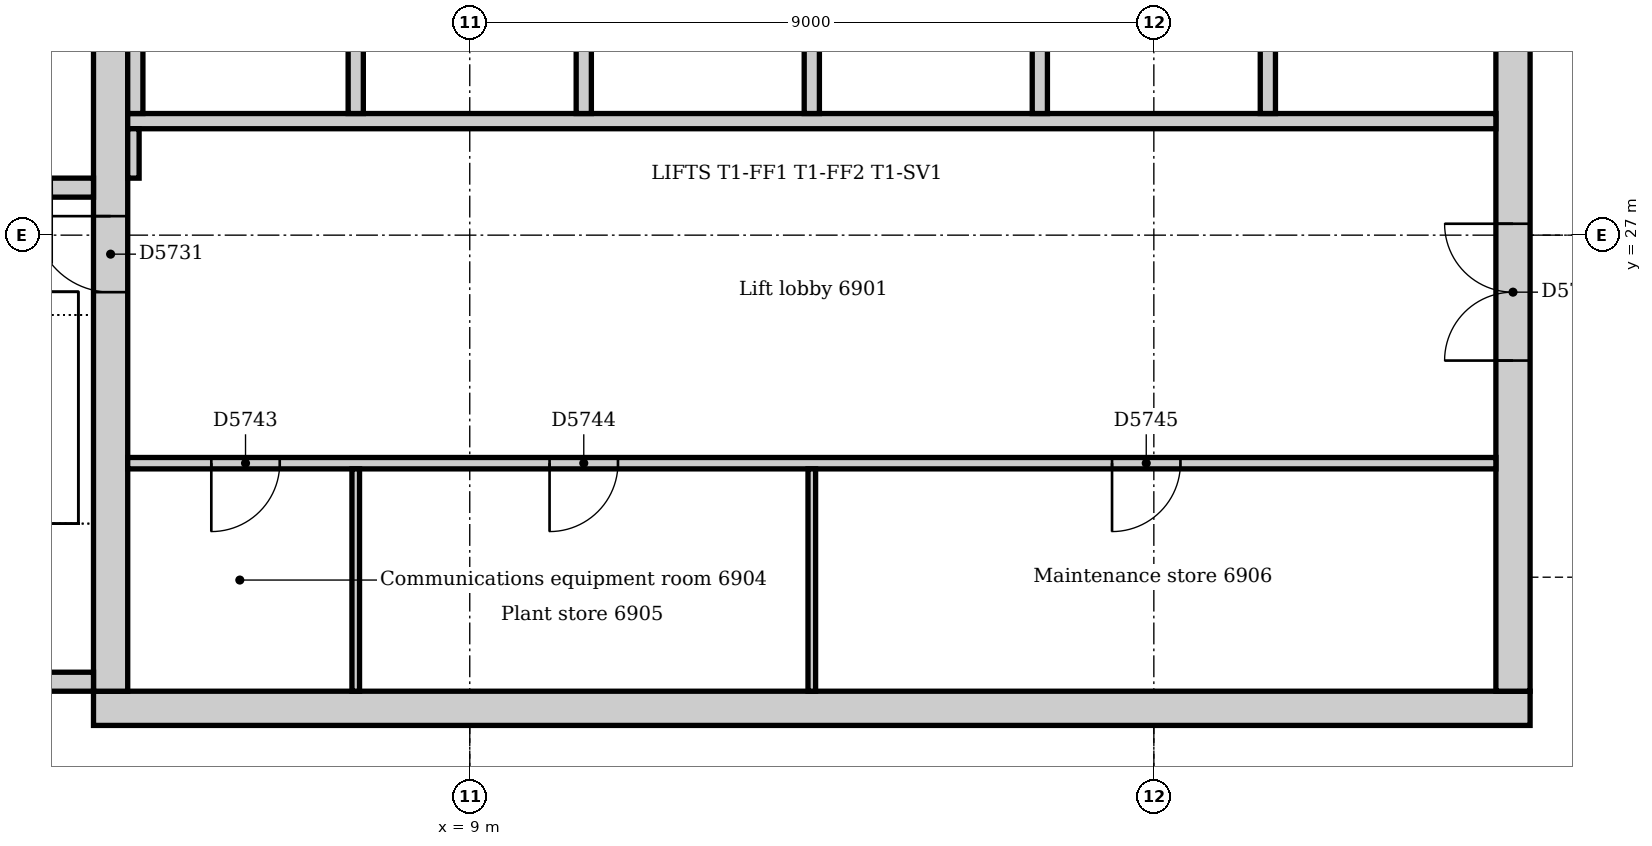
"""IFC4 building model, lengths in metres.
Left out: names, types, materials, properties, quantities, classifications, styles, units other than length and angle.
Written with IfcOpenShell. Run it as: python <this file> out.ifc"""

import sys

from ifc_helpers import new_model, si_unit, direction, frame, frame_2d, origin, place, context, subcontext, project, spatial, rectangle, extrude, element, fill, save


model = new_model("IFC4")
c1 = context("Model", 3, precision=1e-05, world=origin(), true_north=direction((0.0, 1.0)))
c2 = subcontext(c1, "Body", "Model", "MODEL_VIEW")
j1 = project(units=[si_unit("LENGTHUNIT", "METRE"), si_unit("PLANEANGLEUNIT", "RADIAN")], contexts=[c1])
p1 = place(None, origin())
s1 = spatial("IfcSite", under=j1, at=p1, CompositionType="ELEMENT")
p2 = place(p1, origin())
s2 = spatial("IfcBuilding", under=s1, at=p2, CompositionType="ELEMENT")
p3 = place(p2, frame((0.0, 0.0, 291.0)))
s3 = spatial("IfcBuildingStorey", under=s2, at=p3, CompositionType="ELEMENT", Elevation=291.0)
p4 = place(p3, frame((4.05, 20.775, 0.0), z_axis=(0.0, 0.0, 1.0), x_axis=(1.0, 0.0, 0.0)))
e1 = element("IfcWall", 1, at=p4, inside=s3, PredefinedType="SOLIDWALL", context=c2, shape_type="SweptSolid", body=[
    extrude(rectangle(XDim=18.9, YDim=0.45, at=frame_2d((9.45, 0.0))), origin(), (0.0, 0.0, 1.0), 6.55),
])
p5 = place(p3, frame((22.725, 21.0, 0.0), z_axis=(0.0, 0.0, 1.0), x_axis=(0.0, 1.0, 0.0)))
e2 = element("IfcWall", 2, at=p5, inside=s3, PredefinedType="SOLIDWALL", context=c2, shape_type="SweptSolid", body=[
    extrude(rectangle(XDim=10.5, YDim=0.45, at=frame_2d((5.25, 0.0))), origin(), (0.0, 0.0, 1.0), 6.55),
])
p6 = place(p5, frame((4.35, 0.0, 0.0)))
e3 = element("IfcOpeningElement", 3, at=p6, cuts=e2, PredefinedType="OPENING", context=c2, shape_type="SweptSolid", body=[
    extrude(rectangle(XDim=1.8, YDim=2.1, at=frame_2d((0.9, 1.05))), frame((0.0, 0.235, 0.0), z_axis=(0.0, -1.0, 0.0), x_axis=(1.0, 0.0, 0.0)), (0.0, 0.0, 1.0), 0.47),
])
p7 = place(p3, frame((4.275, 31.5, 0.0), z_axis=(0.0, 0.0, 1.0), x_axis=(0.0, -1.0, 0.0)))
e4 = element("IfcWall", 4, at=p7, inside=s3, PredefinedType="SOLIDWALL", context=c2, shape_type="SweptSolid", body=[
    extrude(rectangle(XDim=10.5, YDim=0.45, at=frame_2d((5.25, 0.0))), origin(), (0.0, 0.0, 1.0), 6.55),
])
p8 = place(p7, frame((4.25, 0.0, 0.0)))
e5 = element("IfcOpeningElement", 5, at=p8, cuts=e4, PredefinedType="OPENING", context=c2, shape_type="SweptSolid", body=[
    extrude(rectangle(XDim=1.0, YDim=2.1, at=frame_2d((0.5, 1.05))), frame((0.0, 0.235, 0.0), z_axis=(0.0, -1.0, 0.0), x_axis=(1.0, 0.0, 0.0)), (0.0, 0.0, 1.0), 0.47),
])
p9 = place(p3, frame((0.36, 21.125, 0.0), z_axis=(0.0, 0.0, 1.0), x_axis=(1.0, 0.0, 0.0)))
e6 = element("IfcWall", 6, at=p9, inside=s3, PredefinedType="SOLIDWALL", context=c2, shape_type="SweptSolid", body=[
    extrude(rectangle(XDim=3.69, YDim=0.25, at=frame_2d((1.845, 0.0))), origin(), (0.0, 0.0, 1.0), 6.55),
])
p10 = place(p3, frame((4.05, 27.625, 0.0), z_axis=(0.0, 0.0, 1.0), x_axis=(-1.0, 0.0, 0.0)))
e7 = element("IfcWall", 7, at=p10, inside=s3, PredefinedType="SOLIDWALL", context=c2, shape_type="SweptSolid", body=[
    extrude(rectangle(XDim=3.69, YDim=0.25, at=frame_2d((1.845, 0.0))), origin(), (0.0, 0.0, 1.0), 6.55),
])
p11 = place(p10, frame((0.55, 0.0, 0.0)))
e8 = element("IfcOpeningElement", 8, at=p11, cuts=e7, PredefinedType="OPENING", context=c2, shape_type="SweptSolid", body=[
    extrude(rectangle(XDim=1.0, YDim=2.1, at=frame_2d((0.5, 1.05))), frame((0.0, 0.135, 0.0), z_axis=(0.0, -1.0, 0.0), x_axis=(1.0, 0.0, 0.0)), (0.0, 0.0, 1.0), 0.27),
])
p12 = place(p3, frame((4.5, 28.5, 0.0), z_axis=(0.0, 0.0, 1.0), x_axis=(1.0, 0.0, 0.0)))
e9 = element("IfcWall", 9, at=p12, inside=s3, PredefinedType="PARTITIONING", context=c2, shape_type="SweptSolid", body=[
    extrude(rectangle(XDim=18.0, YDim=0.2, at=frame_2d((9.0, 0.0))), origin(), (0.0, 0.0, 1.0), 6.55),
])
for number, where, z_axis, x_axis in (
    (10, (10.5, 28.6, 0.0), (0.0, 0.0, 1.0), (0.0, 1.0, 0.0)),
    (11, (13.5, 28.6, 0.0), (0.0, 0.0, 1.0), (0.0, 1.0, 0.0)),
    (12, (16.5, 28.6, 0.0), (0.0, 0.0, 1.0), (0.0, 1.0, 0.0)),
    (13, (19.5, 28.6, 0.0), (0.0, 0.0, 1.0), (0.0, 1.0, 0.0)),
    (14, (4.6, 28.6, 0.0), (0.0, 0.0, 1.0), (0.0, 1.0, 0.0)),
    (15, (7.5, 28.6, 0.0), (0.0, 0.0, 1.0), (0.0, 1.0, 0.0)),
):
    element("IfcWall", number, at=place(p3, frame(where, z_axis=z_axis, x_axis=x_axis)), inside=s3, PredefinedType="PARTITIONING", context=c2, shape_type="SweptSolid", body=[
        extrude(rectangle(XDim=2.65, YDim=0.2, at=frame_2d((1.325, 0.0))), origin(), (0.0, 0.0, 1.0), 6.55),
    ])
p13 = place(p3, frame((4.5, 24.0, 0.0), z_axis=(0.0, 0.0, 1.0), x_axis=(1.0, 0.0, 0.0)))
e16 = element("IfcWall", 16, at=p13, inside=s3, PredefinedType="PARTITIONING", context=c2, shape_type="SweptSolid", body=[
    extrude(rectangle(XDim=18.0, YDim=0.15, at=frame_2d((9.0, 0.0))), origin(), (0.0, 0.0, 1.0), 6.55),
])
p14 = place(p13, frame((1.1, 0.0, 0.0)))
e17 = element("IfcOpeningElement", 17, at=p14, cuts=e16, PredefinedType="OPENING", context=c2, shape_type="SweptSolid", body=[
    extrude(rectangle(XDim=0.9, YDim=2.1, at=frame_2d((0.45, 1.05))), frame((0.0, 0.085, 0.0), z_axis=(0.0, -1.0, 0.0), x_axis=(1.0, 0.0, 0.0)), (0.0, 0.0, 1.0), 0.17),
])
p15 = place(p13, frame((5.55, 0.0, 0.0)))
e18 = element("IfcOpeningElement", 18, at=p15, cuts=e16, PredefinedType="OPENING", context=c2, shape_type="SweptSolid", body=[
    extrude(rectangle(XDim=0.9, YDim=2.1, at=frame_2d((0.45, 1.05))), frame((0.0, 0.085, 0.0), z_axis=(0.0, -1.0, 0.0), x_axis=(1.0, 0.0, 0.0)), (0.0, 0.0, 1.0), 0.17),
])
p16 = place(p13, frame((12.95, 0.0, 0.0)))
e19 = element("IfcOpeningElement", 19, at=p16, cuts=e16, PredefinedType="OPENING", context=c2, shape_type="SweptSolid", body=[
    extrude(rectangle(XDim=0.9, YDim=2.1, at=frame_2d((0.45, 1.05))), frame((0.0, 0.085, 0.0), z_axis=(0.0, -1.0, 0.0), x_axis=(1.0, 0.0, 0.0)), (0.0, 0.0, 1.0), 0.17),
])
p17 = place(p3, frame((4.575, 27.75, 0.0), z_axis=(0.0, 0.0, 1.0), x_axis=(0.0, 1.0, 0.0)))
e20 = element("IfcWall", 20, at=p17, inside=s3, PredefinedType="PARTITIONING", context=c2, shape_type="SweptSolid", body=[
    extrude(rectangle(XDim=0.65, YDim=0.15, at=frame_2d((0.325, 0.0))), origin(), (0.0, 0.0, 1.0), 6.55),
])
for number, where, z_axis, x_axis in (
    (21, (7.5, 21.0, 0.0), (0.0, 0.0, 1.0), (0.0, 1.0, 0.0)),
    (22, (13.5, 21.0, 0.0), (0.0, 0.0, 1.0), (0.0, 1.0, 0.0)),
):
    element("IfcWall", number, at=place(p3, frame(where, z_axis=z_axis, x_axis=x_axis)), inside=s3, PredefinedType="PARTITIONING", context=c2, shape_type="SweptSolid", body=[
        extrude(rectangle(XDim=2.925, YDim=0.1, at=frame_2d((1.462, 0.0))), origin(), (0.0, 0.0, 1.0), 6.55),
    ])
p18 = place(p8, frame((1.0, 0.0, 0.0), z_axis=(0.0, 0.0, 1.0), x_axis=(-1.0, 0.0, 0.0)))
e23 = element("IfcDoor", 23, at=p18, inside=s3, OperationType="SINGLE_SWING_RIGHT", PredefinedType="DOOR", context=c2, shape_type="SweptSolid", body=[
    extrude(rectangle(XDim=1.0, YDim=2.1, at=frame_2d((0.5, 1.05))), frame((0.0, 0.025, 0.0), z_axis=(0.0, -1.0, 0.0), x_axis=(1.0, 0.0, 0.0)), (0.0, 0.0, 1.0), 0.05),
])
fill(e5, e23)
p19 = place(p6, origin())
e24 = element("IfcDoor", 24, at=p19, inside=s3, OperationType="DOUBLE_DOOR_DOUBLE_SWING", PredefinedType="DOOR", context=c2, shape_type="SweptSolid", body=[
    extrude(rectangle(XDim=1.8, YDim=2.1, at=frame_2d((0.9, 1.05))), frame((0.0, 0.025, 0.0), z_axis=(0.0, -1.0, 0.0), x_axis=(1.0, 0.0, 0.0)), (0.0, 0.0, 1.0), 0.05),
])
fill(e3, e24)
p20 = place(p14, frame((0.9, 0.0, 0.0), z_axis=(0.0, 0.0, 1.0), x_axis=(-1.0, 0.0, 0.0)))
e25 = element("IfcDoor", 25, at=p20, inside=s3, OperationType="SINGLE_SWING_RIGHT", PredefinedType="DOOR", context=c2, shape_type="SweptSolid", body=[
    extrude(rectangle(XDim=0.9, YDim=2.1, at=frame_2d((0.45, 1.05))), frame((0.0, 0.025, 0.0), z_axis=(0.0, -1.0, 0.0), x_axis=(1.0, 0.0, 0.0)), (0.0, 0.0, 1.0), 0.05),
])
fill(e17, e25)
p21 = place(p15, frame((0.9, 0.0, 0.0), z_axis=(0.0, 0.0, 1.0), x_axis=(-1.0, 0.0, 0.0)))
e26 = element("IfcDoor", 26, at=p21, inside=s3, OperationType="SINGLE_SWING_RIGHT", PredefinedType="DOOR", context=c2, shape_type="SweptSolid", body=[
    extrude(rectangle(XDim=0.9, YDim=2.1, at=frame_2d((0.45, 1.05))), frame((0.0, 0.025, 0.0), z_axis=(0.0, -1.0, 0.0), x_axis=(1.0, 0.0, 0.0)), (0.0, 0.0, 1.0), 0.05),
])
fill(e18, e26)
p22 = place(p16, frame((0.9, 0.0, 0.0), z_axis=(0.0, 0.0, 1.0), x_axis=(-1.0, 0.0, 0.0)))
e27 = element("IfcDoor", 27, at=p22, inside=s3, OperationType="SINGLE_SWING_RIGHT", PredefinedType="DOOR", context=c2, shape_type="SweptSolid", body=[
    extrude(rectangle(XDim=0.9, YDim=2.1, at=frame_2d((0.45, 1.05))), frame((0.0, 0.025, 0.0), z_axis=(0.0, -1.0, 0.0), x_axis=(1.0, 0.0, 0.0)), (0.0, 0.0, 1.0), 0.05),
])
fill(e19, e27)
save(model, sys.argv[1])
